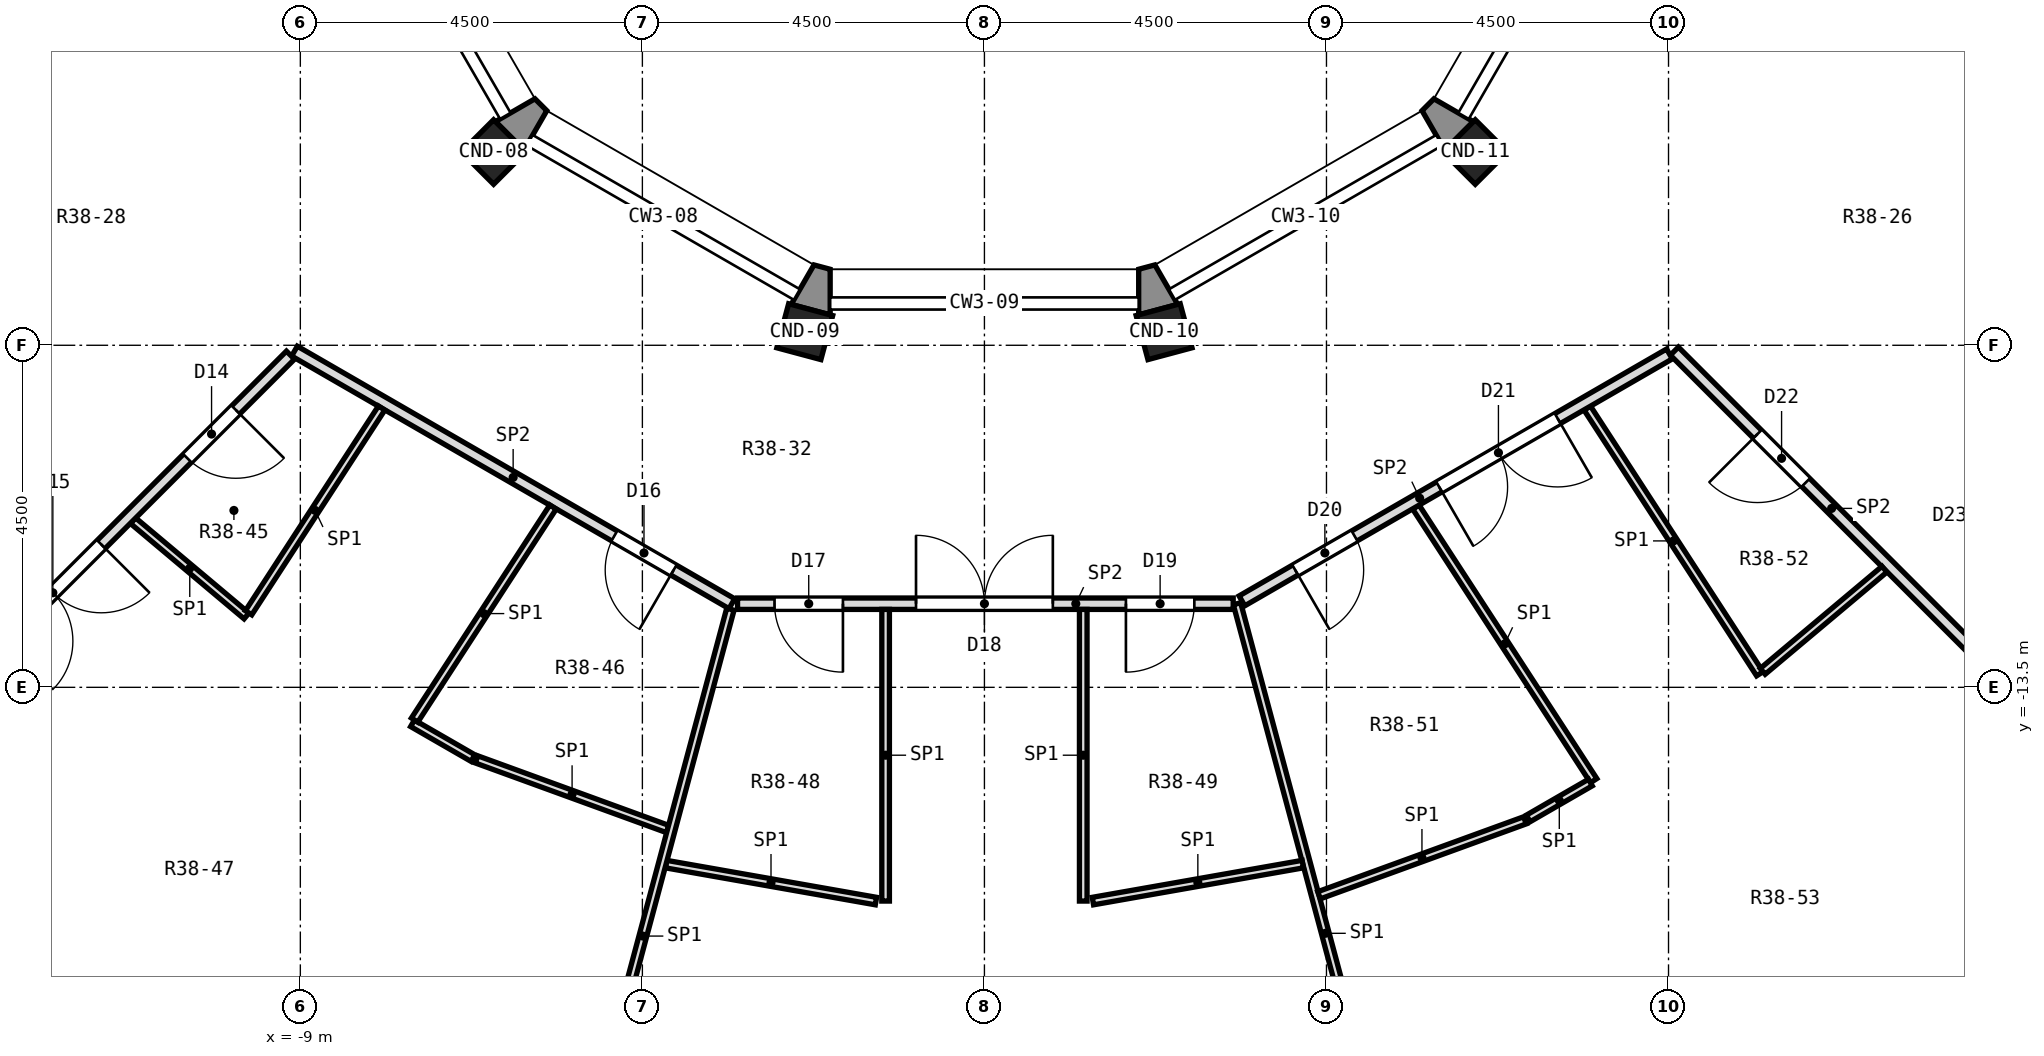
"""IFC4 building model, lengths in metres.
Left out: names, types, materials, properties, quantities, classifications, styles, units other than length and angle.
Written with IfcOpenShell. Run it as: python <this file> out.ifc"""

import sys

from ifc_helpers import new_model, si_unit, direction, frame, frame_2d, origin, origin_2d, place, context, subcontext, project, spatial, polyline, rectangle, outline, extrude, element, fill, save


model = new_model("IFC4")
c1 = context("Model", 3, precision=1e-05, world=origin(), true_north=direction((0.0, 1.0)))
c2 = subcontext(c1, "Body", "Model", "MODEL_VIEW")
j1 = project(units=[si_unit("LENGTHUNIT", "METRE"), si_unit("PLANEANGLEUNIT", "RADIAN")], contexts=[c1])
p1 = place(None, origin())
s1 = spatial("IfcSite", under=j1, at=p1, CompositionType="ELEMENT")
p2 = place(p1, origin())
s2 = spatial("IfcBuilding", under=s1, at=p2, CompositionType="ELEMENT")
p3 = place(p2, frame((0.0, 0.0, 279.2)))
s3 = spatial("IfcBuildingStorey", under=s2, at=p3, CompositionType="ELEMENT", Elevation=279.2)
for number, where, z_axis, x_axis in (
    (1, (-6.458, -6.458, 0.0), (0.0, 0.0, 1.0), (-0.707, -0.707, 0.0)),
    (2, (-2.364, -8.821, 0.0), (0.0, 0.0, 1.0), (-0.259, -0.966, 0.0)),
    (3, (2.364, -8.821, 0.0), (0.0, 0.0, 1.0), (0.259, -0.966, 0.0)),
    (4, (6.458, -6.458, 0.0), (0.0, 0.0, 1.0), (0.707, -0.707, 0.0)),
):
    element("IfcColumn", number, at=place(p3, frame(where, z_axis=z_axis, x_axis=x_axis)), inside=s3, PredefinedType="COLUMN", context=c2, shape_type="SweptSolid", body=[
        extrude(rectangle(XDim=0.6, YDim=0.6, at=origin_2d()), origin(), (0.0, 0.0, 1.0), 5.0),
    ])
p4 = place(p3, origin())
e5 = element("IfcWall", 5, at=p4, inside=s3, PredefinedType="SOLIDWALL", context=c2, shape_type="SweptSolid", body=[
    extrude(outline(polyline([(-6.058, -6.433), (-5.758, -5.914), (-5.914, -5.758), (-6.433, -6.058), (-6.058, -6.433)])), origin(), (0.0, 0.0, 1.0), 4.45),
])
p5 = place(p3, origin())
e6 = element("IfcWall", 6, at=p5, inside=s3, PredefinedType="SOLIDWALL", context=c2, shape_type="SweptSolid", body=[
    extrude(outline(polyline([(-2.029, -8.6), (-2.029, -8.0), (-2.242, -7.943), (-2.542, -8.462), (-2.029, -8.6)])), origin(), (0.0, 0.0, 1.0), 4.45),
])
p6 = place(p3, origin())
e7 = element("IfcWall", 7, at=p6, inside=s3, PredefinedType="SOLIDWALL", context=c2, shape_type="SweptSolid", body=[
    extrude(outline(polyline([(2.542, -8.462), (2.242, -7.943), (2.029, -8.0), (2.029, -8.6), (2.542, -8.462)])), origin(), (0.0, 0.0, 1.0), 4.45),
])
p7 = place(p3, origin())
e8 = element("IfcWall", 8, at=p7, inside=s3, PredefinedType="SOLIDWALL", context=c2, shape_type="SweptSolid", body=[
    extrude(outline(polyline([(6.433, -6.058), (5.914, -5.758), (5.758, -5.914), (6.058, -6.433), (6.433, -6.058)])), origin(), (0.0, 0.0, 1.0), 4.45),
])
p8 = place(p3, frame((3.323, -12.4, 0.0), z_axis=(0.0, 0.0, 1.0), x_axis=(0.258728835498, -0.965949993365, 0.0)))
e9 = element("IfcWall", 9, at=p8, inside=s3, PredefinedType="PARTITIONING", context=c2, shape_type="SweptSolid", body=[
    extrude(rectangle(XDim=8.978, YDim=0.1, at=frame_2d((4.489, 0.0))), origin(), (0.0, 0.0, 1.0), 4.45),
])
p9 = place(p3, frame((5.676, -11.128, 0.0), z_axis=(0.0, 0.0, 1.0), x_axis=(0.544832434593, -0.838544941083, 0.0)))
e10 = element("IfcWall", 10, at=p9, inside=s3, PredefinedType="PARTITIONING", context=c2, shape_type="SweptSolid", body=[
    extrude(rectangle(XDim=4.293, YDim=0.1, at=frame_2d((2.146, 0.0))), origin(), (0.0, 0.0, 1.0), 4.45),
])
p10 = place(p3, frame((7.931, -9.826, 0.0), z_axis=(0.0, 0.0, 1.0), x_axis=(0.544576550515, -0.838711142545, 0.0)))
e11 = element("IfcWall", 11, at=p10, inside=s3, PredefinedType="PARTITIONING", context=c2, shape_type="SweptSolid", body=[
    extrude(rectangle(XDim=4.168, YDim=0.1, at=frame_2d((2.084, 0.0))), origin(), (0.0, 0.0, 1.0), 4.45),
])
p11 = place(p3, frame((9.077, -9.077, 0.0), z_axis=(0.0, 0.0, 1.0), x_axis=(0.707106781187, -0.707106781187, 0.0)))
e12 = element("IfcWall", 12, at=p11, inside=s3, PredefinedType="PARTITIONING", context=c2, shape_type="SweptSolid", body=[
    extrude(rectangle(XDim=5.852, YDim=0.15, at=frame_2d((2.926, 0.0))), origin(), (0.0, 0.0, 1.0), 4.45),
])
p12 = place(p11, frame((1.545, 0.0, 0.0)))
e13 = element("IfcOpeningElement", 13, at=p12, cuts=e12, PredefinedType="OPENING", context=c2, shape_type="SweptSolid", body=[
    extrude(rectangle(XDim=0.9, YDim=2.1, at=frame_2d((0.45, 1.05))), frame((0.0, 0.087, 0.0), z_axis=(0.0, -1.0, 0.0), x_axis=(1.0, 0.0, 0.0)), (0.0, 0.0, 1.0), 0.174),
])
p13 = place(p3, frame((-11.202, -11.307, 0.0), z_axis=(0.0, 0.0, 1.0), x_axis=(0.765897191843, -0.642963056114, 0.0)))
e14 = element("IfcWall", 14, at=p13, inside=s3, PredefinedType="PARTITIONING", context=c2, shape_type="SweptSolid", body=[
    extrude(rectangle(XDim=1.95, YDim=0.1, at=frame_2d((0.975, 0.0))), origin(), (0.0, 0.0, 1.0), 4.45),
])
p14 = place(p3, frame((-9.077, -9.077, 0.0), z_axis=(0.0, 0.0, 1.0), x_axis=(0.865961614908, -0.500110469302, 0.0)))
e15 = element("IfcWall", 15, at=p14, inside=s3, PredefinedType="PARTITIONING", context=c2, shape_type="SweptSolid", body=[
    extrude(rectangle(XDim=6.645, YDim=0.15, at=frame_2d((3.322, 0.0))), origin(), (0.0, 0.0, 1.0), 4.45),
])
p15 = place(p14, frame((4.86, 0.0, 0.0)))
e16 = element("IfcOpeningElement", 16, at=p15, cuts=e15, PredefinedType="OPENING", context=c2, shape_type="SweptSolid", body=[
    extrude(rectangle(XDim=0.9, YDim=2.1, at=frame_2d((0.45, 1.05))), frame((0.0, 0.087, 0.0), z_axis=(0.0, -1.0, 0.0), x_axis=(1.0, 0.0, 0.0)), (0.0, 0.0, 1.0), 0.174),
])
p16 = place(p3, frame((-7.524, -13.973, 0.0), z_axis=(0.0, 0.0, 1.0), x_axis=(0.866468987099, -0.499230902886, 0.0)))
e17 = element("IfcWall", 17, at=p16, inside=s3, PredefinedType="PARTITIONING", context=c2, shape_type="SweptSolid", body=[
    extrude(rectangle(XDim=0.917, YDim=0.1, at=frame_2d((0.459, 0.0))), origin(), (0.0, 0.0, 1.0), 4.45),
])
p17 = place(p3, frame((-6.682, -14.448, 0.0), z_axis=(0.0, 0.0, 1.0), x_axis=(0.939569433945, -0.34235840693, 0.0)))
e18 = element("IfcWall", 18, at=p17, inside=s3, PredefinedType="PARTITIONING", context=c2, shape_type="SweptSolid", body=[
    extrude(rectangle(XDim=2.676, YDim=0.1, at=frame_2d((1.338, 0.0))), origin(), (0.0, 0.0, 1.0), 4.45),
])
p18 = place(p3, frame((-4.189, -15.826, 0.0), z_axis=(0.0, 0.0, 1.0), x_axis=(0.984846599315, -0.173427725056, 0.0)))
e19 = element("IfcWall", 19, at=p18, inside=s3, PredefinedType="PARTITIONING", context=c2, shape_type="SweptSolid", body=[
    extrude(rectangle(XDim=2.804, YDim=0.1, at=frame_2d((1.402, 0.0))), origin(), (0.0, 0.0, 1.0), 4.45),
])
p19 = place(p3, frame((-3.248, -12.4, 0.0), z_axis=(0.0, 0.0, 1.0), x_axis=(1.0, 0.0, 0.0)))
e20 = element("IfcWall", 20, at=p19, inside=s3, PredefinedType="PARTITIONING", context=c2, shape_type="SweptSolid", body=[
    extrude(rectangle(XDim=6.521, YDim=0.15, at=frame_2d((3.26, 0.0))), origin(), (0.0, 0.0, 1.0), 4.45),
])
p20 = place(p19, frame((0.487, 0.0, 0.0)))
e21 = element("IfcOpeningElement", 21, at=p20, cuts=e20, PredefinedType="OPENING", context=c2, shape_type="SweptSolid", body=[
    extrude(rectangle(XDim=0.9, YDim=2.1, at=frame_2d((0.45, 1.05))), frame((0.0, 0.087, 0.0), z_axis=(0.0, -1.0, 0.0), x_axis=(1.0, 0.0, 0.0)), (0.0, 0.0, 1.0), 0.174),
])
p21 = place(p19, frame((2.348, 0.0, 0.0)))
e22 = element("IfcOpeningElement", 22, at=p21, cuts=e20, PredefinedType="OPENING", context=c2, shape_type="SweptSolid", body=[
    extrude(rectangle(XDim=1.8, YDim=2.1, at=frame_2d((0.9, 1.05))), frame((0.0, 0.087, 0.0), z_axis=(0.0, -1.0, 0.0), x_axis=(1.0, 0.0, 0.0)), (0.0, 0.0, 1.0), 0.174),
])
p22 = place(p19, frame((5.11, 0.0, 0.0)))
e23 = element("IfcOpeningElement", 23, at=p22, cuts=e20, PredefinedType="OPENING", context=c2, shape_type="SweptSolid", body=[
    extrude(rectangle(XDim=0.9, YDim=2.1, at=frame_2d((0.45, 1.05))), frame((0.0, 0.087, 0.0), z_axis=(0.0, -1.0, 0.0), x_axis=(1.0, 0.0, 0.0)), (0.0, 0.0, 1.0), 0.174),
])
p23 = place(p3, frame((1.427, -16.312, 0.0), z_axis=(0.0, 0.0, 1.0), x_axis=(0.984846599315, 0.173427725056, 0.0)))
e24 = element("IfcWall", 24, at=p23, inside=s3, PredefinedType="PARTITIONING", context=c2, shape_type="SweptSolid", body=[
    extrude(rectangle(XDim=2.804, YDim=0.1, at=frame_2d((1.402, 0.0))), origin(), (0.0, 0.0, 1.0), 4.45),
])
p24 = place(p3, frame((4.402, -16.236, 0.0), z_axis=(0.0, 0.0, 1.0), x_axis=(0.939709324203, 0.341974247578, 0.0)))
e25 = element("IfcWall", 25, at=p24, inside=s3, PredefinedType="PARTITIONING", context=c2, shape_type="SweptSolid", body=[
    extrude(rectangle(XDim=2.883, YDim=0.1, at=frame_2d((1.441, 0.0))), origin(), (0.0, 0.0, 1.0), 4.45),
])
p25 = place(p3, frame((7.154, -15.225, 0.0), z_axis=(0.0, 0.0, 1.0), x_axis=(0.865909883235, 0.500200034103, 0.0)))
e26 = element("IfcWall", 26, at=p25, inside=s3, PredefinedType="PARTITIONING", context=c2, shape_type="SweptSolid", body=[
    extrude(rectangle(XDim=0.944, YDim=0.1, at=frame_2d((0.472, 0.0))), origin(), (0.0, 0.0, 1.0), 4.45),
])
p26 = place(p3, frame((3.388, -12.363, 0.0), z_axis=(0.0, 0.0, 1.0), x_axis=(0.865967095912, 0.5001009786, 0.0)))
e27 = element("IfcWall", 27, at=p26, inside=s3, PredefinedType="PARTITIONING", context=c2, shape_type="SweptSolid", body=[
    extrude(rectangle(XDim=6.495, YDim=0.15, at=frame_2d((3.248, 0.0))), origin(), (0.0, 0.0, 1.0), 4.45),
])
p27 = place(p26, frame((0.81, 0.0, 0.0)))
e28 = element("IfcOpeningElement", 28, at=p27, cuts=e27, PredefinedType="OPENING", context=c2, shape_type="SweptSolid", body=[
    extrude(rectangle(XDim=0.9, YDim=2.1, at=frame_2d((0.45, 1.05))), frame((0.0, 0.087, 0.0), z_axis=(0.0, -1.0, 0.0), x_axis=(1.0, 0.0, 0.0)), (0.0, 0.0, 1.0), 0.174),
])
p28 = place(p26, frame((2.997, 0.0, 0.0)))
e29 = element("IfcOpeningElement", 29, at=p28, cuts=e27, PredefinedType="OPENING", context=c2, shape_type="SweptSolid", body=[
    extrude(rectangle(XDim=1.8, YDim=2.1, at=frame_2d((0.9, 1.05))), frame((0.0, 0.087, 0.0), z_axis=(0.0, -1.0, 0.0), x_axis=(1.0, 0.0, 0.0)), (0.0, 0.0, 1.0), 0.174),
])
p29 = place(p3, frame((10.239, -13.29, 0.0), z_axis=(0.0, 0.0, 1.0), x_axis=(0.766082082368, 0.642742750308, 0.0)))
e30 = element("IfcWall", 30, at=p29, inside=s3, PredefinedType="PARTITIONING", context=c2, shape_type="SweptSolid", body=[
    extrude(rectangle(XDim=2.09, YDim=0.1, at=frame_2d((1.045, 0.0))), origin(), (0.0, 0.0, 1.0), 4.45),
])
p30 = place(p3, frame((-13.215, -13.215, 0.0), z_axis=(0.0, 0.0, 1.0), x_axis=(0.707106781187, 0.707106781187, 0.0)))
e31 = element("IfcWall", 31, at=p30, inside=s3, PredefinedType="PARTITIONING", context=c2, shape_type="SweptSolid", body=[
    extrude(rectangle(XDim=5.777, YDim=0.15, at=frame_2d((2.888, 0.0))), origin(), (0.0, 0.0, 1.0), 4.45),
])
p31 = place(p30, frame((3.859, 0.0, 0.0)))
e32 = element("IfcOpeningElement", 32, at=p31, cuts=e31, PredefinedType="OPENING", context=c2, shape_type="SweptSolid", body=[
    extrude(rectangle(XDim=0.9, YDim=2.1, at=frame_2d((0.45, 1.05))), frame((0.0, 0.087, 0.0), z_axis=(0.0, -1.0, 0.0), x_axis=(1.0, 0.0, 0.0)), (0.0, 0.0, 1.0), 0.174),
])
p32 = place(p30, frame((0.456, 0.0, 0.0)))
e33 = element("IfcOpeningElement", 33, at=p32, cuts=e31, PredefinedType="OPENING", context=c2, shape_type="SweptSolid", body=[
    extrude(rectangle(XDim=1.8, YDim=2.1, at=frame_2d((0.9, 1.05))), frame((0.0, 0.087, 0.0), z_axis=(0.0, -1.0, 0.0), x_axis=(1.0, 0.0, 0.0)), (0.0, 0.0, 1.0), 0.174),
])
p33 = place(p3, frame((-7.497, -13.931, 0.0), z_axis=(0.0, 0.0, 1.0), x_axis=(0.54476755827, 0.838587089966, 0.0)))
e34 = element("IfcWall", 34, at=p33, inside=s3, PredefinedType="PARTITIONING", context=c2, shape_type="SweptSolid", body=[
    extrude(rectangle(XDim=3.343, YDim=0.1, at=frame_2d((1.671, 0.0))), origin(), (0.0, 0.0, 1.0), 4.45),
])
p34 = place(p3, frame((-9.681, -12.519, 0.0), z_axis=(0.0, 0.0, 1.0), x_axis=(0.544873455053, 0.838518287206, 0.0)))
e35 = element("IfcWall", 35, at=p34, inside=s3, PredefinedType="PARTITIONING", context=c2, shape_type="SweptSolid", body=[
    extrude(rectangle(XDim=3.212, YDim=0.1, at=frame_2d((1.606, 0.0))), origin(), (0.0, 0.0, 1.0), 4.45),
])
p35 = place(p3, frame((-5.645, -21.072, 0.0), z_axis=(0.0, 0.0, 1.0), x_axis=(0.258659321195, 0.965968610028, 0.0)))
e36 = element("IfcWall", 36, at=p35, inside=s3, PredefinedType="PARTITIONING", context=c2, shape_type="SweptSolid", body=[
    extrude(rectangle(XDim=8.903, YDim=0.1, at=frame_2d((4.451, 0.0))), origin(), (0.0, 0.0, 1.0), 4.45),
])
for number, where, z_axis, x_axis in (
    (37, (1.3, -16.312, 0.0), (0.0, 0.0, 1.0), (0.0, 1.0, 0.0)),
    (38, (-1.3, -16.312, 0.0), (0.0, 0.0, 1.0), (0.0, 1.0, 0.0)),
):
    element("IfcWall", number, at=place(p3, frame(where, z_axis=z_axis, x_axis=x_axis)), inside=s3, PredefinedType="PARTITIONING", context=c2, shape_type="SweptSolid", body=[
        extrude(rectangle(XDim=3.837, YDim=0.1, at=frame_2d((1.918, 0.0))), origin(), (0.0, 0.0, 1.0), 4.45),
    ])
p36 = place(p31, frame((0.9, 0.0, 0.0), z_axis=(0.0, 0.0, 1.0), x_axis=(-1.0, 0.0, 0.0)))
e39 = element("IfcDoor", 39, at=p36, inside=s3, OperationType="SINGLE_SWING_LEFT", PredefinedType="DOOR", context=c2, shape_type="SweptSolid", body=[
    extrude(rectangle(XDim=0.9, YDim=2.1, at=frame_2d((0.45, 1.05))), frame((0.0, 0.025, 0.0), z_axis=(0.0, -1.0, 0.0), x_axis=(1.0, 0.0, 0.0)), (0.0, 0.0, 1.0), 0.05),
])
fill(e32, e39)
p37 = place(p32, frame((1.8, 0.0, 0.0), z_axis=(0.0, 0.0, 1.0), x_axis=(-1.0, 0.0, 0.0)))
e40 = element("IfcDoor", 40, at=p37, inside=s3, OperationType="DOUBLE_DOOR_SINGLE_SWING", PredefinedType="DOOR", context=c2, shape_type="SweptSolid", body=[
    extrude(rectangle(XDim=1.8, YDim=2.1, at=frame_2d((0.9, 1.05))), frame((0.0, 0.025, 0.0), z_axis=(0.0, -1.0, 0.0), x_axis=(1.0, 0.0, 0.0)), (0.0, 0.0, 1.0), 0.05),
])
fill(e33, e40)
p38 = place(p15, frame((0.9, 0.0, 0.0), z_axis=(0.0, 0.0, 1.0), x_axis=(-1.0, 0.0, 0.0)))
e41 = element("IfcDoor", 41, at=p38, inside=s3, OperationType="SINGLE_SWING_LEFT", PredefinedType="DOOR", context=c2, shape_type="SweptSolid", body=[
    extrude(rectangle(XDim=0.9, YDim=2.1, at=frame_2d((0.45, 1.05))), frame((0.0, 0.025, 0.0), z_axis=(0.0, -1.0, 0.0), x_axis=(1.0, 0.0, 0.0)), (0.0, 0.0, 1.0), 0.05),
])
fill(e16, e41)
p39 = place(p20, frame((0.9, 0.0, 0.0), z_axis=(0.0, 0.0, 1.0), x_axis=(-1.0, 0.0, 0.0)))
e42 = element("IfcDoor", 42, at=p39, inside=s3, OperationType="SINGLE_SWING_LEFT", PredefinedType="DOOR", context=c2, shape_type="SweptSolid", body=[
    extrude(rectangle(XDim=0.9, YDim=2.1, at=frame_2d((0.45, 1.05))), frame((0.0, 0.025, 0.0), z_axis=(0.0, -1.0, 0.0), x_axis=(1.0, 0.0, 0.0)), (0.0, 0.0, 1.0), 0.05),
])
fill(e21, e42)
p40 = place(p21, origin())
e43 = element("IfcDoor", 43, at=p40, inside=s3, OperationType="DOUBLE_DOOR_SINGLE_SWING", PredefinedType="DOOR", context=c2, shape_type="SweptSolid", body=[
    extrude(rectangle(XDim=1.8, YDim=2.1, at=frame_2d((0.9, 1.05))), frame((0.0, 0.025, 0.0), z_axis=(0.0, -1.0, 0.0), x_axis=(1.0, 0.0, 0.0)), (0.0, 0.0, 1.0), 0.05),
])
fill(e22, e43)
p41 = place(p22, frame((0.9, 0.0, 0.0), z_axis=(0.0, 0.0, 1.0), x_axis=(-1.0, 0.0, 0.0)))
e44 = element("IfcDoor", 44, at=p41, inside=s3, OperationType="SINGLE_SWING_RIGHT", PredefinedType="DOOR", context=c2, shape_type="SweptSolid", body=[
    extrude(rectangle(XDim=0.9, YDim=2.1, at=frame_2d((0.45, 1.05))), frame((0.0, 0.025, 0.0), z_axis=(0.0, -1.0, 0.0), x_axis=(1.0, 0.0, 0.0)), (0.0, 0.0, 1.0), 0.05),
])
fill(e23, e44)
p42 = place(p27, frame((0.9, 0.0, 0.0), z_axis=(0.0, 0.0, 1.0), x_axis=(-1.0, 0.0, 0.0)))
e45 = element("IfcDoor", 45, at=p42, inside=s3, OperationType="SINGLE_SWING_RIGHT", PredefinedType="DOOR", context=c2, shape_type="SweptSolid", body=[
    extrude(rectangle(XDim=0.9, YDim=2.1, at=frame_2d((0.45, 1.05))), frame((0.0, 0.025, 0.0), z_axis=(0.0, -1.0, 0.0), x_axis=(1.0, 0.0, 0.0)), (0.0, 0.0, 1.0), 0.05),
])
fill(e28, e45)
p43 = place(p28, frame((1.8, 0.0, 0.0), z_axis=(0.0, 0.0, 1.0), x_axis=(-1.0, 0.0, 0.0)))
e46 = element("IfcDoor", 46, at=p43, inside=s3, OperationType="DOUBLE_DOOR_SINGLE_SWING", PredefinedType="DOOR", context=c2, shape_type="SweptSolid", body=[
    extrude(rectangle(XDim=1.8, YDim=2.1, at=frame_2d((0.9, 1.05))), frame((0.0, 0.025, 0.0), z_axis=(0.0, -1.0, 0.0), x_axis=(1.0, 0.0, 0.0)), (0.0, 0.0, 1.0), 0.05),
])
fill(e29, e46)
p44 = place(p12, frame((0.9, 0.0, 0.0), z_axis=(0.0, 0.0, 1.0), x_axis=(-1.0, 0.0, 0.0)))
e47 = element("IfcDoor", 47, at=p44, inside=s3, OperationType="SINGLE_SWING_RIGHT", PredefinedType="DOOR", context=c2, shape_type="SweptSolid", body=[
    extrude(rectangle(XDim=0.9, YDim=2.1, at=frame_2d((0.45, 1.05))), frame((0.0, 0.025, 0.0), z_axis=(0.0, -1.0, 0.0), x_axis=(1.0, 0.0, 0.0)), (0.0, 0.0, 1.0), 0.05),
])
fill(e13, e47)
save(model, sys.argv[1])
